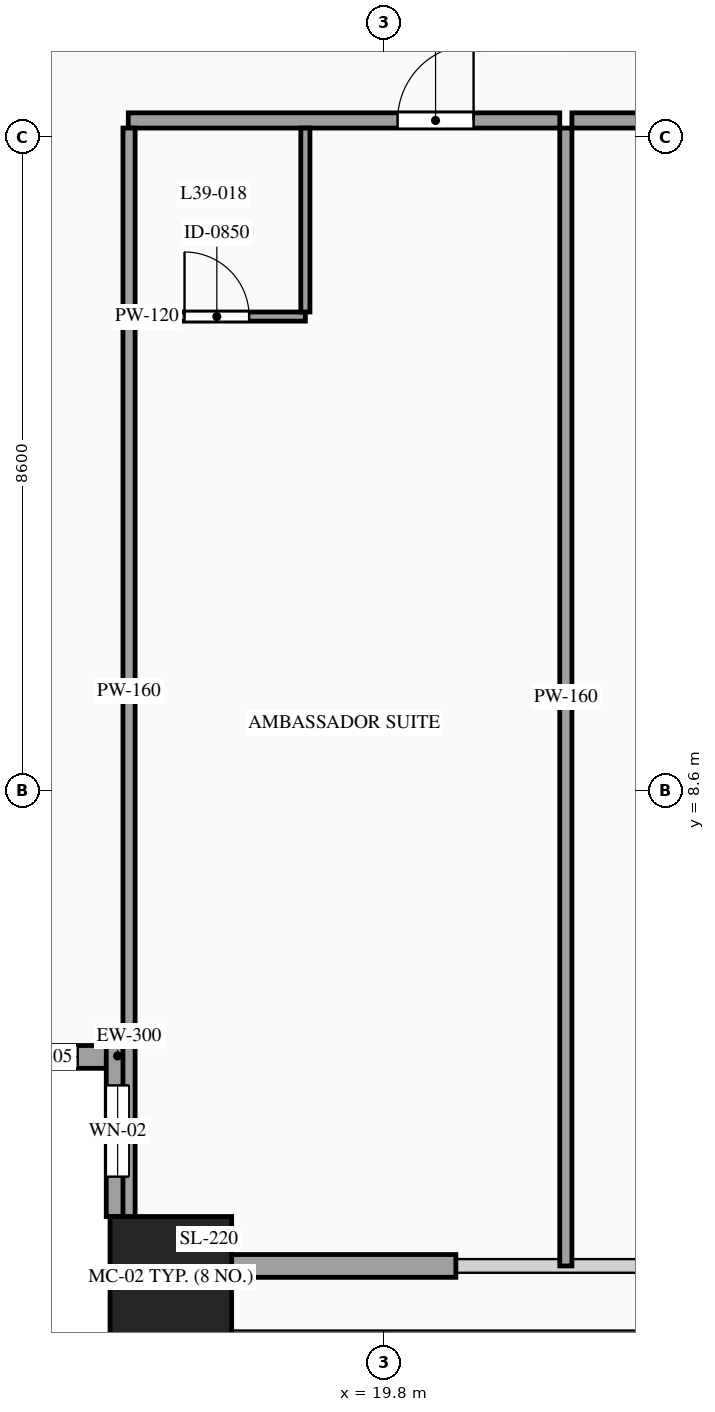
"""IFC4 building model, lengths in metres.
Left out: names, types, materials, properties, quantities, classifications, styles, units other than length and angle.
Written with IfcOpenShell. Run it as: python <this file> out.ifc"""

import sys

from ifc_helpers import new_model, si_unit, direction, frame, frame_2d, origin, origin_2d, place, context, subcontext, project, spatial, rectangle, hollow_rectangle, extrude, source, transform, mapped, element, fill, save


model = new_model("IFC4")
c1 = context("Model", 3, precision=1e-05, world=origin(), true_north=direction((0.0, 1.0)))
c2 = subcontext(c1, "Body", "Model", "MODEL_VIEW")
j1 = project(units=[si_unit("LENGTHUNIT", "METRE"), si_unit("PLANEANGLEUNIT", "RADIAN")], contexts=[c1])
p1 = place(None, origin())
s1 = spatial("IfcSite", under=j1, at=p1, CompositionType="ELEMENT")
p2 = place(p1, origin())
s2 = spatial("IfcBuilding", under=s1, at=p2, CompositionType="ELEMENT")
p3 = place(p2, frame((0.0, 0.0, 148.8)))
s3 = spatial("IfcBuildingStorey", under=s2, at=p3, CompositionType="ELEMENT", Elevation=148.8)
m1 = source(origin(), c2, "Body", "SweptSolid", [
    extrude(hollow_rectangle(XDim=1.6, YDim=1.6, WallThickness=0.07, at=origin_2d()), origin(), (0.0, 0.0, 1.0), 3.6),
])
p4 = place(p3, frame((17.0, 2.2, 0.0), z_axis=(0.0, 0.0, 1.0), x_axis=(1.0, 0.0, 0.0)))
e1 = element("IfcColumn", 1, at=p4, inside=s3, PredefinedType="COLUMN", context=c2, shape_type="MappedRepresentation", body=[
    mapped(m1, transform((0.0, 0.0, 0.0), scale=1.0)),
])
p5 = place(p3, frame((14.2, 5.1, 0.0), z_axis=(0.0, 0.0, 1.0), x_axis=(1.0, 0.0, 0.0)))
e2 = element("IfcWall", 2, at=p5, inside=s3, PredefinedType="SOLIDWALL", context=c2, shape_type="SweptSolid", body=[
    extrude(rectangle(XDim=2.25, YDim=0.3, at=frame_2d((1.125, 0.0))), origin(), (0.0, 0.0, 1.0), 3.38),
])
p6 = place(p5, frame((0.675, 0.0, 0.85)))
e3 = element("IfcOpeningElement", 3, at=p6, cuts=e2, PredefinedType="OPENING", context=c2, shape_type="SweptSolid", body=[
    extrude(rectangle(XDim=0.9, YDim=1.5, at=frame_2d((0.45, 0.75))), frame((0.0, 0.165, 0.0), z_axis=(0.0, -1.0, 0.0), x_axis=(1.0, 0.0, 0.0)), (0.0, 0.0, 1.0), 0.33),
])
p7 = place(p3, frame((16.3, 5.25, 0.0), z_axis=(0.0, 0.0, 1.0), x_axis=(0.0, -1.0, 0.0)))
e4 = element("IfcWall", 4, at=p7, inside=s3, PredefinedType="SOLIDWALL", context=c2, shape_type="SweptSolid", body=[
    extrude(rectangle(XDim=2.25, YDim=0.3, at=frame_2d((1.125, 0.0))), origin(), (0.0, 0.0, 1.0), 3.38),
])
p8 = place(p7, frame((0.525, 0.0, 0.85)))
e5 = element("IfcOpeningElement", 5, at=p8, cuts=e4, PredefinedType="OPENING", context=c2, shape_type="SweptSolid", body=[
    extrude(rectangle(XDim=1.2, YDim=2.1, at=frame_2d((0.6, 1.05))), frame((0.0, 0.165, 0.0), z_axis=(0.0, -1.0, 0.0), x_axis=(1.0, 0.0, 0.0)), (0.0, 0.0, 1.0), 0.33),
])
m2 = source(origin(), c2, "Body", "SweptSolid", [
    extrude(rectangle(XDim=2.95, YDim=0.3, at=frame_2d((1.475, 0.0))), origin(), (0.0, 0.0, 1.0), 2.775),
])
p9 = place(p3, frame((17.8, 2.35, 0.0), z_axis=(0.0, 0.0, 1.0), x_axis=(1.0, 0.0, 0.0)))
e6 = element("IfcWall", 6, at=p9, inside=s3, PredefinedType="SOLIDWALL", context=c2, shape_type="MappedRepresentation", body=[
    mapped(m2, transform((0.0, 0.0, 0.0), scale=1.0)),
])
p10 = place(p3, frame((16.44, 17.42, 0.0), z_axis=(0.0, 0.0, 1.0), x_axis=(1.0, 0.0, 0.0)))
e7 = element("IfcWall", 7, at=p10, inside=s3, PredefinedType="PARTITIONING", context=c2, shape_type="SweptSolid", body=[
    extrude(rectangle(XDim=5.677, YDim=0.2, at=frame_2d((2.838, 0.0))), origin(), (0.0, 0.0, 1.0), 3.38),
])
p11 = place(p10, frame((3.543, 0.0, 0.0)))
e8 = element("IfcOpeningElement", 8, at=p11, cuts=e7, PredefinedType="OPENING", context=c2, shape_type="SweptSolid", body=[
    extrude(rectangle(XDim=1.0, YDim=2.2, at=frame_2d((0.5, 1.1))), frame((0.0, 0.115, 0.0), z_axis=(0.0, -1.0, 0.0), x_axis=(1.0, 0.0, 0.0)), (0.0, 0.0, 1.0), 0.23),
])
m3 = source(origin(), c2, "Body", "SweptSolid", [
    extrude(rectangle(XDim=14.97, YDim=0.16, at=frame_2d((7.485, 0.0))), origin(), (0.0, 0.0, 1.0), 3.38),
])
p12 = place(p3, frame((22.197, 2.35, 0.0), z_axis=(0.0, 0.0, 1.0), x_axis=(0.0, 1.0, 0.0)))
e9 = element("IfcWall", 9, at=p12, inside=s3, PredefinedType="PARTITIONING", context=c2, shape_type="MappedRepresentation", body=[
    mapped(m3, transform((0.0, 0.0, 0.0), scale=1.0)),
])
p13 = place(p3, frame((16.44, 14.84, 0.0), z_axis=(0.0, 0.0, 1.0), x_axis=(1.0, 0.0, 0.0)))
e10 = element("IfcWall", 10, at=p13, inside=s3, PredefinedType="PARTITIONING", context=c2, shape_type="SweptSolid", body=[
    extrude(rectangle(XDim=2.33, YDim=0.12, at=frame_2d((1.165, 0.0))), origin(), (0.0, 0.0, 1.0), 3.38),
])
p14 = place(p13, frame((0.74, 0.0, 0.0)))
e11 = element("IfcOpeningElement", 11, at=p14, cuts=e10, PredefinedType="OPENING", context=c2, shape_type="SweptSolid", body=[
    extrude(rectangle(XDim=0.85, YDim=2.1, at=frame_2d((0.425, 1.05))), frame((0.0, 0.075, 0.0), z_axis=(0.0, -1.0, 0.0), x_axis=(1.0, 0.0, 0.0)), (0.0, 0.0, 1.0), 0.15),
])
m4 = source(origin(), c2, "Body", "SweptSolid", [
    extrude(rectangle(XDim=2.42, YDim=0.12, at=frame_2d((1.21, 0.0))), origin(), (0.0, 0.0, 1.0), 3.38),
])
p15 = place(p3, frame((18.77, 14.9, 0.0), z_axis=(0.0, 0.0, 1.0), x_axis=(0.0, 1.0, 0.0)))
e12 = element("IfcWall", 12, at=p15, inside=s3, PredefinedType="PARTITIONING", context=c2, shape_type="MappedRepresentation", body=[
    mapped(m4, transform((0.0, 0.0, 0.0), scale=1.0)),
])
p16 = place(p3, frame((22.277, 17.42, 0.0), z_axis=(0.0, 0.0, 1.0), x_axis=(1.0, 0.0, 0.0)))
e13 = element("IfcWall", 13, at=p16, inside=s3, PredefinedType="PARTITIONING", context=c2, shape_type="SweptSolid", body=[
    extrude(rectangle(XDim=8.777, YDim=0.2, at=frame_2d((4.388, 0.0))), origin(), (0.0, 0.0, 1.0), 3.38),
])
p17 = place(p16, frame((3.889, 0.0, 0.0)))
e14 = element("IfcOpeningElement", 14, at=p17, cuts=e13, PredefinedType="OPENING", context=c2, shape_type="SweptSolid", body=[
    extrude(rectangle(XDim=1.0, YDim=2.2, at=frame_2d((0.5, 1.1))), frame((0.0, 0.115, 0.0), z_axis=(0.0, -1.0, 0.0), x_axis=(1.0, 0.0, 0.0)), (0.0, 0.0, 1.0), 0.23),
])
m5 = source(origin(), c2, "Body", "SweptSolid", [
    extrude(rectangle(XDim=14.82, YDim=0.16, at=frame_2d((7.41, 0.0))), origin(), (0.0, 0.0, 1.0), 3.38),
])
p18 = place(p3, frame((16.45, 2.5, 0.0), z_axis=(0.0, 0.0, 1.0), x_axis=(0.0, 1.0, 0.0)))
e15 = element("IfcWall", 15, at=p18, inside=s3, PredefinedType="PARTITIONING", context=c2, shape_type="MappedRepresentation", body=[
    mapped(m5, transform((0.0, 0.0, 0.0), scale=1.0)),
])
m6 = source(origin(), c2, "Body", "SweptSolid", [
    extrude(rectangle(XDim=0.9, YDim=1.5, at=frame_2d((0.45, 0.75))), frame((0.0, 0.03, 0.0), z_axis=(0.0, -1.0, 0.0), x_axis=(1.0, 0.0, 0.0)), (0.0, 0.0, 1.0), 0.06),
])
p19 = place(p6, origin())
e16 = element("IfcWindow", 16, at=p19, inside=s3, PartitioningType="SINGLE_PANEL", PredefinedType="WINDOW", context=c2, shape_type="MappedRepresentation", body=[
    mapped(m6, transform((0.0, 0.0, 0.0), scale=1.0)),
])
fill(e3, e16)
m7 = source(origin(), c2, "Body", "SweptSolid", [
    extrude(rectangle(XDim=1.2, YDim=2.1, at=frame_2d((0.6, 1.05))), frame((0.0, 0.03, 0.0), z_axis=(0.0, -1.0, 0.0), x_axis=(1.0, 0.0, 0.0)), (0.0, 0.0, 1.0), 0.06),
])
p20 = place(p8, origin())
e17 = element("IfcWindow", 17, at=p20, inside=s3, PartitioningType="SINGLE_PANEL", PredefinedType="WINDOW", context=c2, shape_type="MappedRepresentation", body=[
    mapped(m7, transform((0.0, 0.0, 0.0), scale=1.0)),
])
fill(e5, e17)
m8 = source(origin(), c2, "Body", "SweptSolid", [
    extrude(rectangle(XDim=1.0, YDim=2.2, at=frame_2d((0.5, 1.1))), frame((0.0, 0.025, 0.0), z_axis=(0.0, -1.0, 0.0), x_axis=(1.0, 0.0, 0.0)), (0.0, 0.0, 1.0), 0.05),
])
p21 = place(p11, origin())
e18 = element("IfcDoor", 18, at=p21, inside=s3, OperationType="SINGLE_SWING_RIGHT", PredefinedType="DOOR", context=c2, shape_type="MappedRepresentation", body=[
    mapped(m8, transform((0.0, 0.0, 0.0), scale=1.0)),
])
fill(e8, e18)
m9 = source(origin(), c2, "Body", "SweptSolid", [
    extrude(rectangle(XDim=0.85, YDim=2.1, at=frame_2d((0.425, 1.05))), frame((0.0, 0.025, 0.0), z_axis=(0.0, -1.0, 0.0), x_axis=(1.0, 0.0, 0.0)), (0.0, 0.0, 1.0), 0.05),
])
p22 = place(p14, origin())
e19 = element("IfcDoor", 19, at=p22, inside=s3, OperationType="SINGLE_SWING_LEFT", PredefinedType="DOOR", context=c2, shape_type="MappedRepresentation", body=[
    mapped(m9, transform((0.0, 0.0, 0.0), scale=1.0)),
])
fill(e11, e19)
save(model, sys.argv[1])
